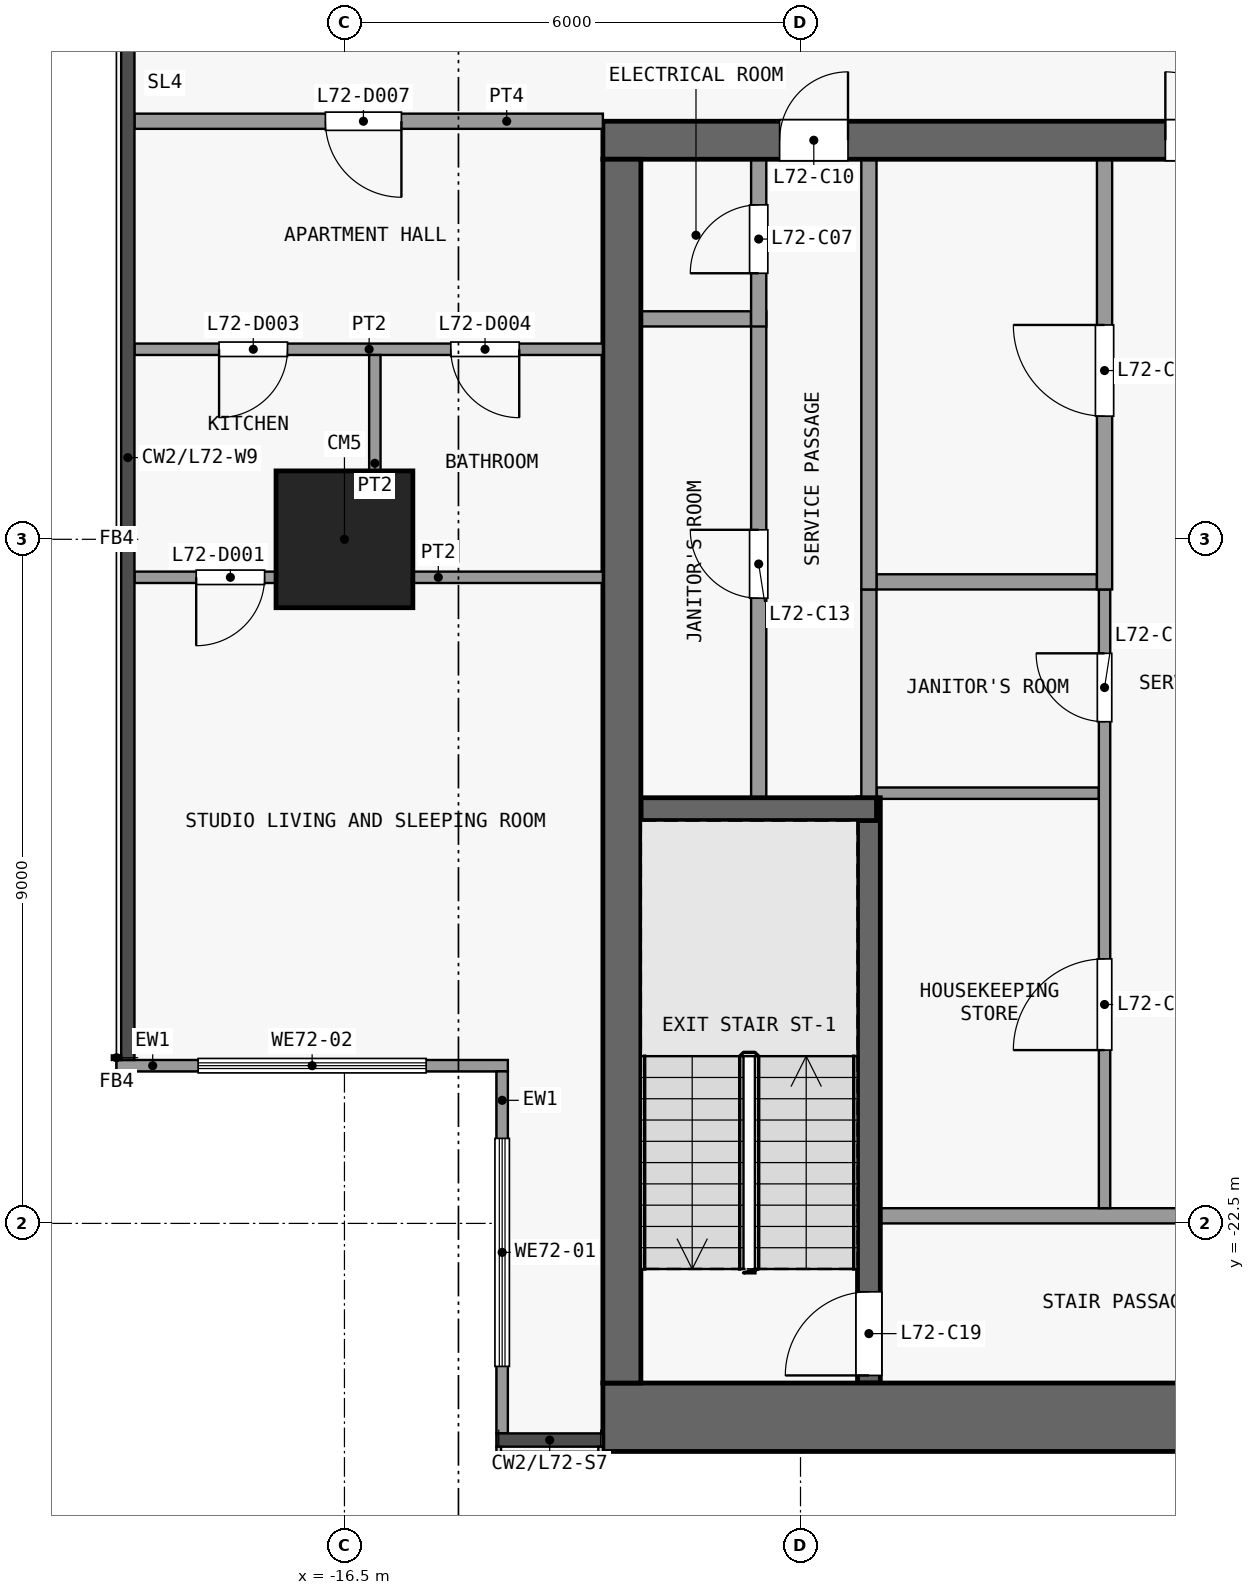
"""IFC4 building model, lengths in metres.
Left out: names, types, materials, properties, quantities, classifications, styles, units other than length and angle.
Written with IfcOpenShell. Run it as: python <this file> out.ifc"""

import sys

from ifc_helpers import new_model, si_unit, direction, frame, frame_2d, origin, origin_2d, place, context, subcontext, project, spatial, rectangle, extrude, element, fill, save


model = new_model("IFC4")
c1 = context("Model", 3, precision=1e-05, world=origin(), true_north=direction((0.0, 1.0)))
c2 = subcontext(c1, "Body", "Model", "MODEL_VIEW")
j1 = project(units=[si_unit("LENGTHUNIT", "METRE"), si_unit("PLANEANGLEUNIT", "RADIAN")], contexts=[c1])
p1 = place(None, origin())
s1 = spatial("IfcSite", under=j1, at=p1, CompositionType="ELEMENT")
p2 = place(p1, origin())
s2 = spatial("IfcBuilding", under=s1, at=p2, CompositionType="ELEMENT")
p3 = place(p2, frame((0.0, 0.0, 284.3)))
s3 = spatial("IfcBuildingStorey", under=s2, at=p3, CompositionType="ELEMENT", Elevation=284.3)
p4 = place(p3, frame((-16.5, -13.5, 0.0), z_axis=(0.0, 0.0, 1.0), x_axis=(1.0, 0.0, 0.0)))
e1 = element("IfcColumn", 1, at=p4, inside=s3, PredefinedType="COLUMN", context=c2, shape_type="SweptSolid", body=[
    extrude(rectangle(XDim=1.8, YDim=1.8, at=origin_2d()), origin(), (0.0, 0.0, 1.0), 3.6),
])
p5 = place(p3, frame((-13.1, -25.05, 0.0), z_axis=(0.0, 0.0, 1.0), x_axis=(1.0, 0.0, 0.0)))
e2 = element("IfcWall", 2, at=p5, inside=s3, PredefinedType="SHEAR", context=c2, shape_type="SweptSolid", body=[
    extrude(rectangle(XDim=26.2, YDim=0.9, at=frame_2d((13.1, 0.0))), origin(), (0.0, 0.0, 1.0), 3.3),
])
p6 = place(p3, frame((-13.1, -8.25, 0.0), z_axis=(0.0, 0.0, 1.0), x_axis=(1.0, 0.0, 0.0)))
e3 = element("IfcWall", 3, at=p6, inside=s3, PredefinedType="SHEAR", context=c2, shape_type="SweptSolid", body=[
    extrude(rectangle(XDim=26.2, YDim=0.5, at=frame_2d((13.1, 0.0))), origin(), (0.0, 0.0, 1.0), 3.3),
])
p7 = place(p6, frame((7.4, 0.0, 0.0)))
e4 = element("IfcOpeningElement", 4, at=p7, cuts=e3, PredefinedType="OPENING", context=c2, shape_type="SweptSolid", body=[
    extrude(rectangle(XDim=1.8, YDim=2.1, at=frame_2d((0.9, 1.05))), frame((0.0, 0.26, 0.0), z_axis=(0.0, -1.0, 0.0), x_axis=(1.0, 0.0, 0.0)), (0.0, 0.0, 1.0), 0.52),
])
p8 = place(p6, frame((17.0, 0.0, 0.0)))
e5 = element("IfcOpeningElement", 5, at=p8, cuts=e3, PredefinedType="OPENING", context=c2, shape_type="SweptSolid", body=[
    extrude(rectangle(XDim=1.8, YDim=2.1, at=frame_2d((0.9, 1.05))), frame((0.0, 0.26, 0.0), z_axis=(0.0, -1.0, 0.0), x_axis=(1.0, 0.0, 0.0)), (0.0, 0.0, 1.0), 0.52),
])
p9 = place(p6, frame((2.325, 0.0, 0.0)))
e6 = element("IfcOpeningElement", 6, at=p9, cuts=e3, PredefinedType="OPENING", context=c2, shape_type="SweptSolid", body=[
    extrude(rectangle(XDim=0.9, YDim=2.1, at=frame_2d((0.45, 1.05))), frame((0.0, 0.26, 0.0), z_axis=(0.0, -1.0, 0.0), x_axis=(1.0, 0.0, 0.0)), (0.0, 0.0, 1.0), 0.52),
])
p10 = place(p6, frame((22.975, 0.0, 0.0)))
e7 = element("IfcOpeningElement", 7, at=p10, cuts=e3, PredefinedType="OPENING", context=c2, shape_type="SweptSolid", body=[
    extrude(rectangle(XDim=0.9, YDim=2.1, at=frame_2d((0.45, 1.05))), frame((0.0, 0.26, 0.0), z_axis=(0.0, -1.0, 0.0), x_axis=(1.0, 0.0, 0.0)), (0.0, 0.0, 1.0), 0.52),
])
p11 = place(p3, frame((-12.85, -24.6, 0.0), z_axis=(0.0, 0.0, 1.0), x_axis=(0.0, 1.0, 0.0)))
e8 = element("IfcWall", 8, at=p11, inside=s3, PredefinedType="SHEAR", context=c2, shape_type="SweptSolid", body=[
    extrude(rectangle(XDim=16.1, YDim=0.5, at=frame_2d((8.05, 0.0))), origin(), (0.0, 0.0, 1.0), 3.3),
])
p12 = place(p3, frame((-3.25, -22.4, 0.0), z_axis=(0.0, 0.0, 1.0), x_axis=(-1.0, 0.0, 0.0)))
e9 = element("IfcWall", 9, at=p12, inside=s3, PredefinedType="PARTITIONING", context=c2, shape_type="SweptSolid", body=[
    extrude(rectangle(XDim=6.2, YDim=0.2, at=frame_2d((3.1, 0.0))), origin(), (0.0, 0.0, 1.0), 3.3),
])
p13 = place(p12, frame((0.8, 0.0, 0.0)))
e10 = element("IfcOpeningElement", 10, at=p13, cuts=e9, PredefinedType="OPENING", context=c2, shape_type="SweptSolid", body=[
    extrude(rectangle(XDim=1.5, YDim=2.1, at=frame_2d((0.75, 1.05))), frame((0.0, 0.11, 0.0), z_axis=(0.0, -1.0, 0.0), x_axis=(1.0, 0.0, 0.0)), (0.0, 0.0, 1.0), 0.22),
])
p14 = place(p3, frame((-12.6, -17.05, 0.0), z_axis=(0.0, 0.0, 1.0), x_axis=(1.0, 0.0, 0.0)))
e11 = element("IfcWall", 11, at=p14, inside=s3, PredefinedType="SHEAR", context=c2, shape_type="SweptSolid", body=[
    extrude(rectangle(XDim=3.1, YDim=0.3, at=frame_2d((1.55, 0.0))), origin(), (0.0, 0.0, 1.0), 3.3),
])
p15 = place(p3, frame((-9.5, -16.84, 0.0), z_axis=(0.0, 0.0, 1.0), x_axis=(1.0, 0.0, 0.0)))
e12 = element("IfcWall", 12, at=p15, inside=s3, PredefinedType="PARTITIONING", context=c2, shape_type="SweptSolid", body=[
    extrude(rectangle(XDim=2.925, YDim=0.15, at=frame_2d((1.462, 0.0))), origin(), (0.0, 0.0, 1.0), 3.3),
])
p16 = place(p3, frame((-9.5, -14.06, 0.0), z_axis=(0.0, 0.0, 1.0), x_axis=(1.0, 0.0, 0.0)))
e13 = element("IfcWall", 13, at=p16, inside=s3, PredefinedType="PARTITIONING", context=c2, shape_type="SweptSolid", body=[
    extrude(rectangle(XDim=2.9, YDim=0.2, at=frame_2d((1.45, 0.0))), origin(), (0.0, 0.0, 1.0), 3.3),
])
p17 = place(p3, frame((-12.6, -10.6, 0.0), z_axis=(0.0, 0.0, 1.0), x_axis=(1.0, 0.0, 0.0)))
e14 = element("IfcWall", 14, at=p17, inside=s3, PredefinedType="PARTITIONING", context=c2, shape_type="SweptSolid", body=[
    extrude(rectangle(XDim=1.45, YDim=0.2, at=frame_2d((0.725, 0.0))), origin(), (0.0, 0.0, 1.0), 3.3),
])
p18 = place(p3, frame((-11.05, -16.9, 0.0), z_axis=(0.0, 0.0, 1.0), x_axis=(0.0, 1.0, 0.0)))
e15 = element("IfcWall", 15, at=p18, inside=s3, PredefinedType="PARTITIONING", context=c2, shape_type="SweptSolid", body=[
    extrude(rectangle(XDim=6.4, YDim=0.2, at=frame_2d((3.2, 0.0))), origin(), (0.0, 0.0, 1.0), 3.3),
])
p19 = place(p18, frame((2.625, 0.0, 0.0)))
e16 = element("IfcOpeningElement", 16, at=p19, cuts=e15, PredefinedType="OPENING", context=c2, shape_type="SweptSolid", body=[
    extrude(rectangle(XDim=0.9, YDim=2.1, at=frame_2d((0.45, 1.05))), frame((0.0, 0.11, 0.0), z_axis=(0.0, -1.0, 0.0), x_axis=(1.0, 0.0, 0.0)), (0.0, 0.0, 1.0), 0.22),
])
p20 = place(p3, frame((-11.05, -10.7, 0.0), z_axis=(0.0, 0.0, 1.0), x_axis=(0.0, 1.0, 0.0)))
e17 = element("IfcWall", 17, at=p20, inside=s3, PredefinedType="PARTITIONING", context=c2, shape_type="SweptSolid", body=[
    extrude(rectangle(XDim=2.2, YDim=0.2, at=frame_2d((1.1, 0.0))), origin(), (0.0, 0.0, 1.0), 3.3),
])
p21 = place(p20, frame((0.7, 0.0, 0.0)))
e18 = element("IfcOpeningElement", 18, at=p21, cuts=e17, PredefinedType="OPENING", context=c2, shape_type="SweptSolid", body=[
    extrude(rectangle(XDim=0.9, YDim=2.1, at=frame_2d((0.45, 1.05))), frame((0.0, 0.11, 0.0), z_axis=(0.0, -1.0, 0.0), x_axis=(1.0, 0.0, 0.0)), (0.0, 0.0, 1.0), 0.22),
])
p22 = place(p3, frame((-9.6, -24.6, 0.0), z_axis=(0.0, 0.0, 1.0), x_axis=(0.0, 1.0, 0.0)))
e19 = element("IfcWall", 19, at=p22, inside=s3, PredefinedType="SHEAR", context=c2, shape_type="SweptSolid", body=[
    extrude(rectangle(XDim=7.7, YDim=0.3, at=frame_2d((3.85, 0.0))), origin(), (0.0, 0.0, 1.0), 3.3),
])
p23 = place(p22, frame((0.1, 0.0, 0.0)))
e20 = element("IfcOpeningElement", 20, at=p23, cuts=e19, PredefinedType="OPENING", context=c2, shape_type="SweptSolid", body=[
    extrude(rectangle(XDim=1.1, YDim=2.1, at=frame_2d((0.55, 1.05))), frame((0.0, 0.16, 0.0), z_axis=(0.0, -1.0, 0.0), x_axis=(1.0, 0.0, 0.0)), (0.0, 0.0, 1.0), 0.32),
])
p24 = place(p3, frame((-9.6, -16.9, 0.0), z_axis=(0.0, 0.0, 1.0), x_axis=(0.0, 1.0, 0.0)))
e21 = element("IfcWall", 21, at=p24, inside=s3, PredefinedType="PARTITIONING", context=c2, shape_type="SweptSolid", body=[
    extrude(rectangle(XDim=2.74, YDim=0.2, at=frame_2d((1.37, 0.0))), origin(), (0.0, 0.0, 1.0), 3.3),
])
p25 = place(p3, frame((-9.6, -14.16, 0.0), z_axis=(0.0, 0.0, 1.0), x_axis=(0.0, 1.0, 0.0)))
e22 = element("IfcWall", 22, at=p25, inside=s3, PredefinedType="PARTITIONING", context=c2, shape_type="SweptSolid", body=[
    extrude(rectangle(XDim=5.66, YDim=0.2, at=frame_2d((2.83, 0.0))), origin(), (0.0, 0.0, 1.0), 3.3),
])
p26 = place(p3, frame((-6.5, -22.3, 0.0), z_axis=(0.0, 0.0, 1.0), x_axis=(0.0, 1.0, 0.0)))
e23 = element("IfcWall", 23, at=p26, inside=s3, PredefinedType="PARTITIONING", context=c2, shape_type="SweptSolid", body=[
    extrude(rectangle(XDim=8.14, YDim=0.15, at=frame_2d((4.07, 0.0))), origin(), (0.0, 0.0, 1.0), 3.3),
])
p27 = place(p26, frame((2.08, 0.0, 0.0)))
e24 = element("IfcOpeningElement", 24, at=p27, cuts=e23, PredefinedType="OPENING", context=c2, shape_type="SweptSolid", body=[
    extrude(rectangle(XDim=1.2, YDim=2.1, at=frame_2d((0.6, 1.05))), frame((0.0, 0.085, 0.0), z_axis=(0.0, -1.0, 0.0), x_axis=(1.0, 0.0, 0.0)), (0.0, 0.0, 1.0), 0.17),
])
p28 = place(p26, frame((6.4, 0.0, 0.0)))
e25 = element("IfcOpeningElement", 25, at=p28, cuts=e23, PredefinedType="OPENING", context=c2, shape_type="SweptSolid", body=[
    extrude(rectangle(XDim=0.9, YDim=2.1, at=frame_2d((0.45, 1.05))), frame((0.0, 0.085, 0.0), z_axis=(0.0, -1.0, 0.0), x_axis=(1.0, 0.0, 0.0)), (0.0, 0.0, 1.0), 0.17),
])
p29 = place(p3, frame((-6.5, -14.16, 0.0), z_axis=(0.0, 0.0, 1.0), x_axis=(0.0, 1.0, 0.0)))
e26 = element("IfcWall", 26, at=p29, inside=s3, PredefinedType="PARTITIONING", context=c2, shape_type="SweptSolid", body=[
    extrude(rectangle(XDim=5.66, YDim=0.2, at=frame_2d((2.83, 0.0))), origin(), (0.0, 0.0, 1.0), 3.3),
])
p30 = place(p29, frame((2.28, 0.0, 0.0)))
e27 = element("IfcOpeningElement", 27, at=p30, cuts=e26, PredefinedType="OPENING", context=c2, shape_type="SweptSolid", body=[
    extrude(rectangle(XDim=1.2, YDim=2.1, at=frame_2d((0.6, 1.05))), frame((0.0, 0.11, 0.0), z_axis=(0.0, -1.0, 0.0), x_axis=(1.0, 0.0, 0.0)), (0.0, 0.0, 1.0), 0.22),
])
p31 = place(p3, frame((-14.425, -25.262, 0.0), z_axis=(0.0, 0.0, 1.0), x_axis=(0.0, 1.0, 0.0)))
e28 = element("IfcWall", 28, at=p31, inside=s3, PredefinedType="SOLIDWALL", context=c2, shape_type="SweptSolid", body=[
    extrude(rectangle(XDim=4.762, YDim=0.15, at=frame_2d((2.381, 0.0))), origin(), (0.0, 0.0, 1.0), 3.3),
])
p32 = place(p31, frame((0.881, 0.0, 0.9)))
e29 = element("IfcOpeningElement", 29, at=p32, cuts=e28, PredefinedType="OPENING", context=c2, shape_type="SweptSolid", body=[
    extrude(rectangle(XDim=3.0, YDim=2.4, at=frame_2d((1.5, 1.2))), frame((0.0, 0.085, 0.0), z_axis=(0.0, -1.0, 0.0), x_axis=(1.0, 0.0, 0.0)), (0.0, 0.0, 1.0), 0.17),
])
p33 = place(p3, frame((-14.35, -20.425, 0.0), z_axis=(0.0, 0.0, 1.0), x_axis=(-1.0, 0.0, 0.0)))
e30 = element("IfcWall", 30, at=p33, inside=s3, PredefinedType="SOLIDWALL", context=c2, shape_type="SweptSolid", body=[
    extrude(rectangle(XDim=5.15, YDim=0.15, at=frame_2d((2.575, 0.0))), origin(), (0.0, 0.0, 1.0), 3.3),
])
p34 = place(p33, frame((1.075, 0.0, 0.9)))
e31 = element("IfcOpeningElement", 31, at=p34, cuts=e30, PredefinedType="OPENING", context=c2, shape_type="SweptSolid", body=[
    extrude(rectangle(XDim=3.0, YDim=2.4, at=frame_2d((1.5, 1.2))), frame((0.0, 0.085, 0.0), z_axis=(0.0, -1.0, 0.0), x_axis=(1.0, 0.0, 0.0)), (0.0, 0.0, 1.0), 0.17),
])
p35 = place(p3, frame((-19.262, -14.0, 0.0), z_axis=(0.0, 0.0, 1.0), x_axis=(1.0, 0.0, 0.0)))
e32 = element("IfcWall", 32, at=p35, inside=s3, PredefinedType="PARTITIONING", context=c2, shape_type="SweptSolid", body=[
    extrude(rectangle(XDim=6.162, YDim=0.15, at=frame_2d((3.081, 0.0))), origin(), (0.0, 0.0, 1.0), 3.3),
])
p36 = place(p35, frame((0.812, 0.0, 0.0)))
e33 = element("IfcOpeningElement", 33, at=p36, cuts=e32, PredefinedType="OPENING", context=c2, shape_type="SweptSolid", body=[
    extrude(rectangle(XDim=0.9, YDim=2.1, at=frame_2d((0.45, 1.05))), frame((0.0, 0.085, 0.0), z_axis=(0.0, -1.0, 0.0), x_axis=(1.0, 0.0, 0.0)), (0.0, 0.0, 1.0), 0.17),
])
p37 = place(p3, frame((-19.262, -11.0, 0.0), z_axis=(0.0, 0.0, 1.0), x_axis=(1.0, 0.0, 0.0)))
e34 = element("IfcWall", 34, at=p37, inside=s3, PredefinedType="PARTITIONING", context=c2, shape_type="SweptSolid", body=[
    extrude(rectangle(XDim=6.162, YDim=0.15, at=frame_2d((3.081, 0.0))), origin(), (0.0, 0.0, 1.0), 3.3),
])
p38 = place(p37, frame((1.113, 0.0, 0.0)))
e35 = element("IfcOpeningElement", 35, at=p38, cuts=e34, PredefinedType="OPENING", context=c2, shape_type="SweptSolid", body=[
    extrude(rectangle(XDim=0.9, YDim=2.1, at=frame_2d((0.45, 1.05))), frame((0.0, 0.085, 0.0), z_axis=(0.0, -1.0, 0.0), x_axis=(1.0, 0.0, 0.0)), (0.0, 0.0, 1.0), 0.17),
])
p39 = place(p37, frame((4.162, 0.0, 0.0)))
e36 = element("IfcOpeningElement", 36, at=p39, cuts=e34, PredefinedType="OPENING", context=c2, shape_type="SweptSolid", body=[
    extrude(rectangle(XDim=0.9, YDim=2.1, at=frame_2d((0.45, 1.05))), frame((0.0, 0.085, 0.0), z_axis=(0.0, -1.0, 0.0), x_axis=(1.0, 0.0, 0.0)), (0.0, 0.0, 1.0), 0.17),
])
p40 = place(p3, frame((-19.262, -8.0, 0.0), z_axis=(0.0, 0.0, 1.0), x_axis=(1.0, 0.0, 0.0)))
e37 = element("IfcWall", 37, at=p40, inside=s3, PredefinedType="PARTITIONING", context=c2, shape_type="SweptSolid", body=[
    extrude(rectangle(XDim=6.162, YDim=0.2, at=frame_2d((3.081, 0.0))), origin(), (0.0, 0.0, 1.0), 3.3),
])
p41 = place(p40, frame((2.512, 0.0, 0.0)))
e38 = element("IfcOpeningElement", 38, at=p41, cuts=e37, PredefinedType="OPENING", context=c2, shape_type="SweptSolid", body=[
    extrude(rectangle(XDim=1.0, YDim=2.1, at=frame_2d((0.5, 1.05))), frame((0.0, 0.11, 0.0), z_axis=(0.0, -1.0, 0.0), x_axis=(1.0, 0.0, 0.0)), (0.0, 0.0, 1.0), 0.22),
])
p42 = place(p3, frame((-16.1, -13.925, 0.0), z_axis=(0.0, 0.0, 1.0), x_axis=(0.0, 1.0, 0.0)))
e39 = element("IfcWall", 39, at=p42, inside=s3, PredefinedType="PARTITIONING", context=c2, shape_type="SweptSolid", body=[
    extrude(rectangle(XDim=2.85, YDim=0.15, at=frame_2d((1.425, 0.0))), origin(), (0.0, 0.0, 1.0), 3.3),
])
p43 = place(p7, origin())
e40 = element("IfcDoor", 40, at=p43, inside=s3, OperationType="DOUBLE_DOOR_SINGLE_SWING", PredefinedType="DOOR", context=c2, shape_type="SweptSolid", body=[
    extrude(rectangle(XDim=1.8, YDim=2.1, at=frame_2d((0.9, 1.05))), frame((0.0, 0.025, 0.0), z_axis=(0.0, -1.0, 0.0), x_axis=(1.0, 0.0, 0.0)), (0.0, 0.0, 1.0), 0.05),
])
fill(e4, e40)
p44 = place(p21, origin())
e41 = element("IfcDoor", 41, at=p44, inside=s3, OperationType="SINGLE_SWING_LEFT", PredefinedType="DOOR", context=c2, shape_type="SweptSolid", body=[
    extrude(rectangle(XDim=0.9, YDim=2.1, at=frame_2d((0.45, 1.05))), frame((0.0, 0.025, 0.0), z_axis=(0.0, -1.0, 0.0), x_axis=(1.0, 0.0, 0.0)), (0.0, 0.0, 1.0), 0.05),
])
fill(e18, e41)
p45 = place(p30, origin())
e42 = element("IfcDoor", 42, at=p45, inside=s3, OperationType="SINGLE_SWING_RIGHT", PredefinedType="DOOR", context=c2, shape_type="SweptSolid", body=[
    extrude(rectangle(XDim=1.2, YDim=2.1, at=frame_2d((0.6, 1.05))), frame((0.0, 0.025, 0.0), z_axis=(0.0, -1.0, 0.0), x_axis=(1.0, 0.0, 0.0)), (0.0, 0.0, 1.0), 0.05),
])
fill(e27, e42)
p46 = place(p9, origin())
e43 = element("IfcDoor", 43, at=p46, inside=s3, OperationType="SINGLE_SWING_RIGHT", PredefinedType="DOOR", context=c2, shape_type="SweptSolid", body=[
    extrude(rectangle(XDim=0.9, YDim=2.1, at=frame_2d((0.45, 1.05))), frame((0.0, 0.025, 0.0), z_axis=(0.0, -1.0, 0.0), x_axis=(1.0, 0.0, 0.0)), (0.0, 0.0, 1.0), 0.05),
])
fill(e6, e43)
p47 = place(p19, origin())
e44 = element("IfcDoor", 44, at=p47, inside=s3, OperationType="SINGLE_SWING_RIGHT", PredefinedType="DOOR", context=c2, shape_type="SweptSolid", body=[
    extrude(rectangle(XDim=0.9, YDim=2.1, at=frame_2d((0.45, 1.05))), frame((0.0, 0.025, 0.0), z_axis=(0.0, -1.0, 0.0), x_axis=(1.0, 0.0, 0.0)), (0.0, 0.0, 1.0), 0.05),
])
fill(e16, e44)
p48 = place(p27, origin())
e45 = element("IfcDoor", 45, at=p48, inside=s3, OperationType="SINGLE_SWING_LEFT", PredefinedType="DOOR", context=c2, shape_type="SweptSolid", body=[
    extrude(rectangle(XDim=1.2, YDim=2.1, at=frame_2d((0.6, 1.05))), frame((0.0, 0.025, 0.0), z_axis=(0.0, -1.0, 0.0), x_axis=(1.0, 0.0, 0.0)), (0.0, 0.0, 1.0), 0.05),
])
fill(e24, e45)
p49 = place(p28, origin())
e46 = element("IfcDoor", 46, at=p49, inside=s3, OperationType="SINGLE_SWING_RIGHT", PredefinedType="DOOR", context=c2, shape_type="SweptSolid", body=[
    extrude(rectangle(XDim=0.9, YDim=2.1, at=frame_2d((0.45, 1.05))), frame((0.0, 0.025, 0.0), z_axis=(0.0, -1.0, 0.0), x_axis=(1.0, 0.0, 0.0)), (0.0, 0.0, 1.0), 0.05),
])
fill(e25, e46)
p50 = place(p23, origin())
e47 = element("IfcDoor", 47, at=p50, inside=s3, OperationType="SINGLE_SWING_LEFT", PredefinedType="DOOR", context=c2, shape_type="SweptSolid", body=[
    extrude(rectangle(XDim=1.1, YDim=2.1, at=frame_2d((0.55, 1.05))), frame((0.0, 0.025, 0.0), z_axis=(0.0, -1.0, 0.0), x_axis=(1.0, 0.0, 0.0)), (0.0, 0.0, 1.0), 0.05),
])
fill(e20, e47)
p51 = place(p32, origin())
e48 = element("IfcWindow", 48, at=p51, inside=s3, PartitioningType="SINGLE_PANEL", PredefinedType="WINDOW", context=c2, shape_type="SweptSolid", body=[
    extrude(rectangle(XDim=3.0, YDim=2.4, at=frame_2d((1.5, 1.2))), frame((0.0, 0.03, 0.0), z_axis=(0.0, -1.0, 0.0), x_axis=(1.0, 0.0, 0.0)), (0.0, 0.0, 1.0), 0.06),
])
fill(e29, e48)
p52 = place(p34, origin())
e49 = element("IfcWindow", 49, at=p52, inside=s3, PartitioningType="SINGLE_PANEL", PredefinedType="WINDOW", context=c2, shape_type="SweptSolid", body=[
    extrude(rectangle(XDim=3.0, YDim=2.4, at=frame_2d((1.5, 1.2))), frame((0.0, 0.03, 0.0), z_axis=(0.0, -1.0, 0.0), x_axis=(1.0, 0.0, 0.0)), (0.0, 0.0, 1.0), 0.06),
])
fill(e31, e49)
p53 = place(p36, origin())
e50 = element("IfcDoor", 50, at=p53, inside=s3, OperationType="SINGLE_SWING_LEFT", PredefinedType="DOOR", context=c2, shape_type="SweptSolid", body=[
    extrude(rectangle(XDim=0.9, YDim=2.1, at=frame_2d((0.45, 1.05))), frame((0.0, 0.025, 0.0), z_axis=(0.0, -1.0, 0.0), x_axis=(1.0, 0.0, 0.0)), (0.0, 0.0, 1.0), 0.05),
])
fill(e33, e50)
p54 = place(p38, origin())
e51 = element("IfcDoor", 51, at=p54, inside=s3, OperationType="SINGLE_SWING_LEFT", PredefinedType="DOOR", context=c2, shape_type="SweptSolid", body=[
    extrude(rectangle(XDim=0.9, YDim=2.1, at=frame_2d((0.45, 1.05))), frame((0.0, 0.025, 0.0), z_axis=(0.0, -1.0, 0.0), x_axis=(1.0, 0.0, 0.0)), (0.0, 0.0, 1.0), 0.05),
])
fill(e35, e51)
p55 = place(p39, origin())
e52 = element("IfcDoor", 52, at=p55, inside=s3, OperationType="SINGLE_SWING_RIGHT", PredefinedType="DOOR", context=c2, shape_type="SweptSolid", body=[
    extrude(rectangle(XDim=0.9, YDim=2.1, at=frame_2d((0.45, 1.05))), frame((0.0, 0.025, 0.0), z_axis=(0.0, -1.0, 0.0), x_axis=(1.0, 0.0, 0.0)), (0.0, 0.0, 1.0), 0.05),
])
fill(e36, e52)
p56 = place(p41, origin())
e53 = element("IfcDoor", 53, at=p56, inside=s3, OperationType="SINGLE_SWING_RIGHT", PredefinedType="DOOR", context=c2, shape_type="SweptSolid", body=[
    extrude(rectangle(XDim=1.0, YDim=2.1, at=frame_2d((0.5, 1.05))), frame((0.0, 0.025, 0.0), z_axis=(0.0, -1.0, 0.0), x_axis=(1.0, 0.0, 0.0)), (0.0, 0.0, 1.0), 0.05),
])
fill(e38, e53)
save(model, sys.argv[1])
